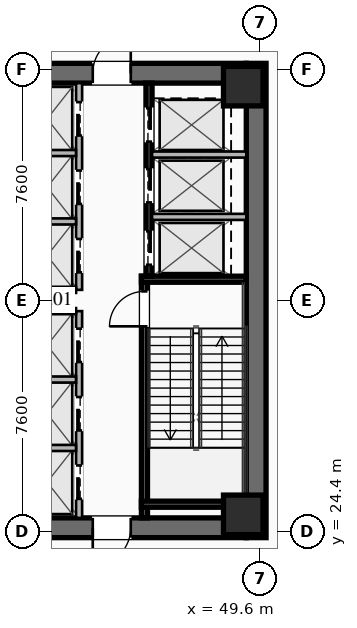
"""IFC4 building model, lengths in metres.
Left out: names, types, materials, properties, quantities, classifications, styles, units other than length and angle.
Written with IfcOpenShell. Run it as: python <this file> out.ifc"""

import sys

from ifc_helpers import new_model, si_unit, direction, frame, frame_2d, origin, origin_2d, place, context, subcontext, project, spatial, rectangle, hollow_rectangle, extrude, element, fill, save


model = new_model("IFC4")
c1 = context("Model", 3, precision=1e-05, world=origin(), true_north=direction((0.0, 1.0)))
c2 = subcontext(c1, "Body", "Model", "MODEL_VIEW")
j1 = project(units=[si_unit("LENGTHUNIT", "METRE"), si_unit("PLANEANGLEUNIT", "RADIAN")], contexts=[c1])
p1 = place(None, origin())
s1 = spatial("IfcSite", under=j1, at=p1, CompositionType="ELEMENT")
p2 = place(p1, origin())
s2 = spatial("IfcBuilding", under=s1, at=p2, CompositionType="ELEMENT")
p3 = place(p2, origin())
s3 = spatial("IfcBuildingStorey", under=s2, at=p3, CompositionType="ELEMENT", Elevation=0.0)
p4 = place(p3, frame((49.475, 39.8, 0.0), z_axis=(0.0, 0.0, 1.0), x_axis=(0.0, -1.0, 0.0)))
e1 = element("IfcWall", 1, at=p4, inside=s3, PredefinedType="SHEAR", context=c2, shape_type="SweptSolid", body=[
    extrude(rectangle(XDim=15.6, YDim=0.65, at=frame_2d((7.8, 0.0))), origin(), (0.0, 0.0, 1.0), 5.4),
])
p5 = place(p3, frame((49.15, 24.525, 0.0), z_axis=(0.0, 0.0, 1.0), x_axis=(-1.0, 0.0, 0.0)))
e2 = element("IfcWall", 2, at=p5, inside=s3, PredefinedType="SHEAR", context=c2, shape_type="SweptSolid", body=[
    extrude(rectangle(XDim=14.3, YDim=0.65, at=frame_2d((7.15, 0.0))), origin(), (0.0, 0.0, 1.0), 5.4),
])
p6 = place(p5, frame((8.85, 0.0, 0.0)))
e3 = element("IfcOpeningElement", 3, at=p6, cuts=e2, PredefinedType="OPENING", context=c2, shape_type="SweptSolid", body=[
    extrude(rectangle(XDim=1.25, YDim=2.25, at=frame_2d((0.625, 1.125))), frame((0.0, 0.335, 0.0), z_axis=(0.0, -1.0, 0.0), x_axis=(1.0, 0.0, 0.0)), (0.0, 0.0, 1.0), 0.67),
])
p7 = place(p5, frame((3.8, 0.0, 0.0)))
e4 = element("IfcOpeningElement", 4, at=p7, cuts=e2, PredefinedType="OPENING", context=c2, shape_type="SweptSolid", body=[
    extrude(rectangle(XDim=1.25, YDim=2.25, at=frame_2d((0.625, 1.125))), frame((0.0, 0.335, 0.0), z_axis=(0.0, -1.0, 0.0), x_axis=(1.0, 0.0, 0.0)), (0.0, 0.0, 1.0), 0.67),
])
p8 = place(p3, frame((34.85, 39.475, 0.0), z_axis=(0.0, 0.0, 1.0), x_axis=(1.0, 0.0, 0.0)))
e5 = element("IfcWall", 5, at=p8, inside=s3, PredefinedType="SHEAR", context=c2, shape_type="SweptSolid", body=[
    extrude(rectangle(XDim=14.3, YDim=0.65, at=frame_2d((7.15, 0.0))), origin(), (0.0, 0.0, 1.0), 5.4),
])
p9 = place(p8, frame((4.2, 0.0, 0.0)))
e6 = element("IfcOpeningElement", 6, at=p9, cuts=e5, PredefinedType="OPENING", context=c2, shape_type="SweptSolid", body=[
    extrude(rectangle(XDim=1.25, YDim=2.25, at=frame_2d((0.625, 1.125))), frame((0.0, 0.335, 0.0), z_axis=(0.0, -1.0, 0.0), x_axis=(1.0, 0.0, 0.0)), (0.0, 0.0, 1.0), 0.67),
])
p10 = place(p8, frame((9.25, 0.0, 0.0)))
e7 = element("IfcOpeningElement", 7, at=p10, cuts=e5, PredefinedType="OPENING", context=c2, shape_type="SweptSolid", body=[
    extrude(rectangle(XDim=1.25, YDim=2.25, at=frame_2d((0.625, 1.125))), frame((0.0, 0.335, 0.0), z_axis=(0.0, -1.0, 0.0), x_axis=(1.0, 0.0, 0.0)), (0.0, 0.0, 1.0), 0.67),
])
for number, where, z_axis, x_axis in (
    (8, (49.05, 24.95, 0.0), (0.0, 0.0, 1.0), (1.0, 0.0, 0.0)),
    (9, (49.05, 39.05, 0.0), (0.0, 0.0, 1.0), (1.0, 0.0, 0.0)),
):
    element("IfcColumn", number, at=place(p3, frame(where, z_axis=z_axis, x_axis=x_axis)), inside=s3, PredefinedType="COLUMN", context=c2, shape_type="SweptSolid", body=[
        extrude(hollow_rectangle(XDim=1.3, YDim=1.3, WallThickness=0.05, at=origin_2d()), origin(), (0.0, 0.0, 1.0), 5.14),
    ])
p11 = place(p3, frame((45.8, 24.85, 0.0), z_axis=(0.0, 0.0, 1.0), x_axis=(0.0, 1.0, 0.0)))
e10 = element("IfcWall", 10, at=p11, inside=s3, PredefinedType="SHEAR", context=c2, shape_type="SweptSolid", body=[
    extrude(rectangle(XDim=7.95, YDim=0.2, at=frame_2d((3.975, 0.0))), origin(), (0.0, 0.0, 1.0), 5.14),
])
p12 = place(p11, frame((6.3, 0.0, 0.0)))
e11 = element("IfcOpeningElement", 11, at=p12, cuts=e10, PredefinedType="OPENING", context=c2, shape_type="SweptSolid", body=[
    extrude(rectangle(XDim=1.15, YDim=2.2, at=frame_2d((0.575, 1.1))), frame((0.0, 0.11, 0.0), z_axis=(0.0, -1.0, 0.0), x_axis=(1.0, 0.0, 0.0)), (0.0, 0.0, 1.0), 0.22),
])
for number, where, z_axis, x_axis in (
    (12, (45.7, 32.7, 0.0), (0.0, 0.0, 1.0), (1.0, 0.0, 0.0)),
    (13, (45.7, 25.3, 0.0), (0.0, 0.0, 1.0), (1.0, 0.0, 0.0)),
):
    element("IfcWall", number, at=place(p3, frame(where, z_axis=z_axis, x_axis=x_axis)), inside=s3, PredefinedType="SHEAR", context=c2, shape_type="SweptSolid", body=[
        extrude(rectangle(XDim=3.45, YDim=0.2, at=frame_2d((1.725, 0.0))), origin(), (0.0, 0.0, 1.0), 5.14),
    ])
p13 = place(p3, frame((45.95, 39.15, 0.0), z_axis=(0.0, 0.0, 1.0), x_axis=(0.0, -1.0, 0.0)))
e14 = element("IfcWall", 14, at=p13, inside=s3, PredefinedType="SHEAR", context=c2, shape_type="SweptSolid", body=[
    extrude(rectangle(XDim=6.35, YDim=0.2, at=frame_2d((3.175, 0.0))), origin(), (0.0, 0.0, 1.0), 5.14),
])
p14 = place(p13, frame((4.875, 0.0, 0.0)))
e15 = element("IfcOpeningElement", 15, at=p14, cuts=e14, PredefinedType="OPENING", context=c2, shape_type="SweptSolid", body=[
    extrude(rectangle(XDim=1.1, YDim=2.2, at=frame_2d((0.55, 1.1))), frame((0.0, 0.11, 0.0), z_axis=(0.0, -1.0, 0.0), x_axis=(1.0, 0.0, 0.0)), (0.0, 0.0, 1.0), 0.22),
])
p15 = place(p13, frame((2.825, 0.0, 0.0)))
e16 = element("IfcOpeningElement", 16, at=p15, cuts=e14, PredefinedType="OPENING", context=c2, shape_type="SweptSolid", body=[
    extrude(rectangle(XDim=1.1, YDim=2.2, at=frame_2d((0.55, 1.1))), frame((0.0, 0.11, 0.0), z_axis=(0.0, -1.0, 0.0), x_axis=(1.0, 0.0, 0.0)), (0.0, 0.0, 1.0), 0.22),
])
p16 = place(p13, frame((0.825, 0.0, 0.0)))
e17 = element("IfcOpeningElement", 17, at=p16, cuts=e14, PredefinedType="OPENING", context=c2, shape_type="SweptSolid", body=[
    extrude(rectangle(XDim=1.1, YDim=2.2, at=frame_2d((0.55, 1.1))), frame((0.0, 0.11, 0.0), z_axis=(0.0, -1.0, 0.0), x_axis=(1.0, 0.0, 0.0)), (0.0, 0.0, 1.0), 0.22),
])
for number, where, z_axis, x_axis in (
    (18, (46.05, 34.75, 0.0), (0.0, 0.0, 1.0), (1.0, 0.0, 0.0)),
    (19, (46.05, 36.8, 0.0), (0.0, 0.0, 1.0), (1.0, 0.0, 0.0)),
):
    element("IfcWall", number, at=place(p3, frame(where, z_axis=z_axis, x_axis=x_axis)), inside=s3, PredefinedType="SOLIDWALL", context=c2, shape_type="SweptSolid", body=[
        extrude(rectangle(XDim=3.1, YDim=0.2, at=frame_2d((1.55, 0.0))), origin(), (0.0, 0.0, 1.0), 5.14),
    ])
p17 = place(p3, frame((43.65, 24.85, 0.0), z_axis=(0.0, 0.0, 1.0), x_axis=(0.0, 1.0, 0.0)))
e20 = element("IfcWall", 20, at=p17, inside=s3, PredefinedType="SOLIDWALL", context=c2, shape_type="SweptSolid", body=[
    extrude(rectangle(XDim=6.8, YDim=0.2, at=frame_2d((3.4, 0.0))), origin(), (0.0, 0.0, 1.0), 5.14),
])
p18 = place(p17, frame((0.625, 0.0, 0.0)))
e21 = element("IfcOpeningElement", 21, at=p18, cuts=e20, PredefinedType="OPENING", context=c2, shape_type="SweptSolid", body=[
    extrude(rectangle(XDim=1.1, YDim=2.2, at=frame_2d((0.55, 1.1))), frame((0.0, 0.11, 0.0), z_axis=(0.0, -1.0, 0.0), x_axis=(1.0, 0.0, 0.0)), (0.0, 0.0, 1.0), 0.22),
])
p19 = place(p17, frame((2.875, 0.0, 0.0)))
e22 = element("IfcOpeningElement", 22, at=p19, cuts=e20, PredefinedType="OPENING", context=c2, shape_type="SweptSolid", body=[
    extrude(rectangle(XDim=1.1, YDim=2.2, at=frame_2d((0.55, 1.1))), frame((0.0, 0.11, 0.0), z_axis=(0.0, -1.0, 0.0), x_axis=(1.0, 0.0, 0.0)), (0.0, 0.0, 1.0), 0.22),
])
p20 = place(p17, frame((5.125, 0.0, 0.0)))
e23 = element("IfcOpeningElement", 23, at=p20, cuts=e20, PredefinedType="OPENING", context=c2, shape_type="SweptSolid", body=[
    extrude(rectangle(XDim=1.1, YDim=2.2, at=frame_2d((0.55, 1.1))), frame((0.0, 0.11, 0.0), z_axis=(0.0, -1.0, 0.0), x_axis=(1.0, 0.0, 0.0)), (0.0, 0.0, 1.0), 0.22),
])
for number, where, z_axis, x_axis in (
    (24, (41.67, 27.15, 0.0), (0.0, 0.0, 1.0), (1.0, 0.0, 0.0)),
    (25, (41.67, 29.4, 0.0), (0.0, 0.0, 1.0), (1.0, 0.0, 0.0)),
    (26, (41.67, 31.65, 0.0), (0.0, 0.0, 1.0), (1.0, 0.0, 0.0)),
):
    element("IfcWall", number, at=place(p3, frame(where, z_axis=z_axis, x_axis=x_axis)), inside=s3, PredefinedType="SOLIDWALL", context=c2, shape_type="SweptSolid", body=[
        extrude(rectangle(XDim=1.88, YDim=0.2, at=frame_2d((0.94, 0.0))), origin(), (0.0, 0.0, 1.0), 5.14),
    ])
p21 = place(p3, frame((43.65, 32.35, 0.0), z_axis=(0.0, 0.0, 1.0), x_axis=(0.0, 1.0, 0.0)))
e27 = element("IfcWall", 27, at=p21, inside=s3, PredefinedType="SOLIDWALL", context=c2, shape_type="SweptSolid", body=[
    extrude(rectangle(XDim=6.8, YDim=0.2, at=frame_2d((3.4, 0.0))), origin(), (0.0, 0.0, 1.0), 5.14),
])
p22 = place(p21, frame((0.575, 0.0, 0.0)))
e28 = element("IfcOpeningElement", 28, at=p22, cuts=e27, PredefinedType="OPENING", context=c2, shape_type="SweptSolid", body=[
    extrude(rectangle(XDim=1.1, YDim=2.2, at=frame_2d((0.55, 1.1))), frame((0.0, 0.11, 0.0), z_axis=(0.0, -1.0, 0.0), x_axis=(1.0, 0.0, 0.0)), (0.0, 0.0, 1.0), 0.22),
])
p23 = place(p21, frame((2.825, 0.0, 0.0)))
e29 = element("IfcOpeningElement", 29, at=p23, cuts=e27, PredefinedType="OPENING", context=c2, shape_type="SweptSolid", body=[
    extrude(rectangle(XDim=1.1, YDim=2.2, at=frame_2d((0.55, 1.1))), frame((0.0, 0.11, 0.0), z_axis=(0.0, -1.0, 0.0), x_axis=(1.0, 0.0, 0.0)), (0.0, 0.0, 1.0), 0.22),
])
p24 = place(p21, frame((5.075, 0.0, 0.0)))
e30 = element("IfcOpeningElement", 30, at=p24, cuts=e27, PredefinedType="OPENING", context=c2, shape_type="SweptSolid", body=[
    extrude(rectangle(XDim=1.1, YDim=2.2, at=frame_2d((0.55, 1.1))), frame((0.0, 0.11, 0.0), z_axis=(0.0, -1.0, 0.0), x_axis=(1.0, 0.0, 0.0)), (0.0, 0.0, 1.0), 0.22),
])
for number, where, z_axis, x_axis in (
    (31, (41.67, 32.35, 0.0), (0.0, 0.0, 1.0), (1.0, 0.0, 0.0)),
    (32, (41.67, 34.6, 0.0), (0.0, 0.0, 1.0), (1.0, 0.0, 0.0)),
    (33, (41.67, 36.85, 0.0), (0.0, 0.0, 1.0), (1.0, 0.0, 0.0)),
):
    element("IfcWall", number, at=place(p3, frame(where, z_axis=z_axis, x_axis=x_axis)), inside=s3, PredefinedType="SOLIDWALL", context=c2, shape_type="SweptSolid", body=[
        extrude(rectangle(XDim=1.88, YDim=0.2, at=frame_2d((0.94, 0.0))), origin(), (0.0, 0.0, 1.0), 5.14),
    ])
p25 = place(p10, origin())
e34 = element("IfcDoor", 34, at=p25, inside=s3, OperationType="SINGLE_SWING_RIGHT", PredefinedType="DOOR", context=c2, shape_type="SweptSolid", body=[
    extrude(rectangle(XDim=1.25, YDim=2.25, at=frame_2d((0.625, 1.125))), frame((0.0, 0.025, 0.0), z_axis=(0.0, -1.0, 0.0), x_axis=(1.0, 0.0, 0.0)), (0.0, 0.0, 1.0), 0.05),
])
fill(e7, e34)
p26 = place(p7, origin())
e35 = element("IfcDoor", 35, at=p26, inside=s3, OperationType="SINGLE_SWING_RIGHT", PredefinedType="DOOR", context=c2, shape_type="SweptSolid", body=[
    extrude(rectangle(XDim=1.25, YDim=2.25, at=frame_2d((0.625, 1.125))), frame((0.0, 0.025, 0.0), z_axis=(0.0, -1.0, 0.0), x_axis=(1.0, 0.0, 0.0)), (0.0, 0.0, 1.0), 0.05),
])
fill(e4, e35)
p27 = place(p12, origin())
e36 = element("IfcDoor", 36, at=p27, inside=s3, OperationType="SINGLE_SWING_LEFT", PredefinedType="DOOR", context=c2, shape_type="SweptSolid", body=[
    extrude(rectangle(XDim=1.15, YDim=2.2, at=frame_2d((0.575, 1.1))), frame((0.0, 0.025, 0.0), z_axis=(0.0, -1.0, 0.0), x_axis=(1.0, 0.0, 0.0)), (0.0, 0.0, 1.0), 0.05),
])
fill(e11, e36)
p28 = place(p18, origin())
e37 = element("IfcDoor", 37, at=p28, inside=s3, OperationType="SLIDING_TO_LEFT", PredefinedType="DOOR", context=c2, shape_type="SweptSolid", body=[
    extrude(rectangle(XDim=1.1, YDim=2.2, at=frame_2d((0.55, 1.1))), frame((0.0, 0.025, 0.0), z_axis=(0.0, -1.0, 0.0), x_axis=(1.0, 0.0, 0.0)), (0.0, 0.0, 1.0), 0.05),
])
fill(e21, e37)
p29 = place(p19, origin())
e38 = element("IfcDoor", 38, at=p29, inside=s3, OperationType="SLIDING_TO_LEFT", PredefinedType="DOOR", context=c2, shape_type="SweptSolid", body=[
    extrude(rectangle(XDim=1.1, YDim=2.2, at=frame_2d((0.55, 1.1))), frame((0.0, 0.025, 0.0), z_axis=(0.0, -1.0, 0.0), x_axis=(1.0, 0.0, 0.0)), (0.0, 0.0, 1.0), 0.05),
])
fill(e22, e38)
p30 = place(p20, origin())
e39 = element("IfcDoor", 39, at=p30, inside=s3, OperationType="SLIDING_TO_LEFT", PredefinedType="DOOR", context=c2, shape_type="SweptSolid", body=[
    extrude(rectangle(XDim=1.1, YDim=2.2, at=frame_2d((0.55, 1.1))), frame((0.0, 0.025, 0.0), z_axis=(0.0, -1.0, 0.0), x_axis=(1.0, 0.0, 0.0)), (0.0, 0.0, 1.0), 0.05),
])
fill(e23, e39)
p31 = place(p22, origin())
e40 = element("IfcDoor", 40, at=p31, inside=s3, OperationType="SLIDING_TO_LEFT", PredefinedType="DOOR", context=c2, shape_type="SweptSolid", body=[
    extrude(rectangle(XDim=1.1, YDim=2.2, at=frame_2d((0.55, 1.1))), frame((0.0, 0.025, 0.0), z_axis=(0.0, -1.0, 0.0), x_axis=(1.0, 0.0, 0.0)), (0.0, 0.0, 1.0), 0.05),
])
fill(e28, e40)
p32 = place(p23, origin())
e41 = element("IfcDoor", 41, at=p32, inside=s3, OperationType="SLIDING_TO_LEFT", PredefinedType="DOOR", context=c2, shape_type="SweptSolid", body=[
    extrude(rectangle(XDim=1.1, YDim=2.2, at=frame_2d((0.55, 1.1))), frame((0.0, 0.025, 0.0), z_axis=(0.0, -1.0, 0.0), x_axis=(1.0, 0.0, 0.0)), (0.0, 0.0, 1.0), 0.05),
])
fill(e29, e41)
p33 = place(p24, origin())
e42 = element("IfcDoor", 42, at=p33, inside=s3, OperationType="SLIDING_TO_LEFT", PredefinedType="DOOR", context=c2, shape_type="SweptSolid", body=[
    extrude(rectangle(XDim=1.1, YDim=2.2, at=frame_2d((0.55, 1.1))), frame((0.0, 0.025, 0.0), z_axis=(0.0, -1.0, 0.0), x_axis=(1.0, 0.0, 0.0)), (0.0, 0.0, 1.0), 0.05),
])
fill(e30, e42)
p34 = place(p14, origin())
e43 = element("IfcDoor", 43, at=p34, inside=s3, OperationType="SLIDING_TO_LEFT", PredefinedType="DOOR", context=c2, shape_type="SweptSolid", body=[
    extrude(rectangle(XDim=1.1, YDim=2.2, at=frame_2d((0.55, 1.1))), frame((0.0, 0.025, 0.0), z_axis=(0.0, -1.0, 0.0), x_axis=(1.0, 0.0, 0.0)), (0.0, 0.0, 1.0), 0.05),
])
fill(e15, e43)
p35 = place(p15, origin())
e44 = element("IfcDoor", 44, at=p35, inside=s3, OperationType="SLIDING_TO_LEFT", PredefinedType="DOOR", context=c2, shape_type="SweptSolid", body=[
    extrude(rectangle(XDim=1.1, YDim=2.2, at=frame_2d((0.55, 1.1))), frame((0.0, 0.025, 0.0), z_axis=(0.0, -1.0, 0.0), x_axis=(1.0, 0.0, 0.0)), (0.0, 0.0, 1.0), 0.05),
])
fill(e16, e44)
p36 = place(p16, origin())
e45 = element("IfcDoor", 45, at=p36, inside=s3, OperationType="SLIDING_TO_LEFT", PredefinedType="DOOR", context=c2, shape_type="SweptSolid", body=[
    extrude(rectangle(XDim=1.1, YDim=2.2, at=frame_2d((0.55, 1.1))), frame((0.0, 0.025, 0.0), z_axis=(0.0, -1.0, 0.0), x_axis=(1.0, 0.0, 0.0)), (0.0, 0.0, 1.0), 0.05),
])
fill(e17, e45)
save(model, sys.argv[1])
